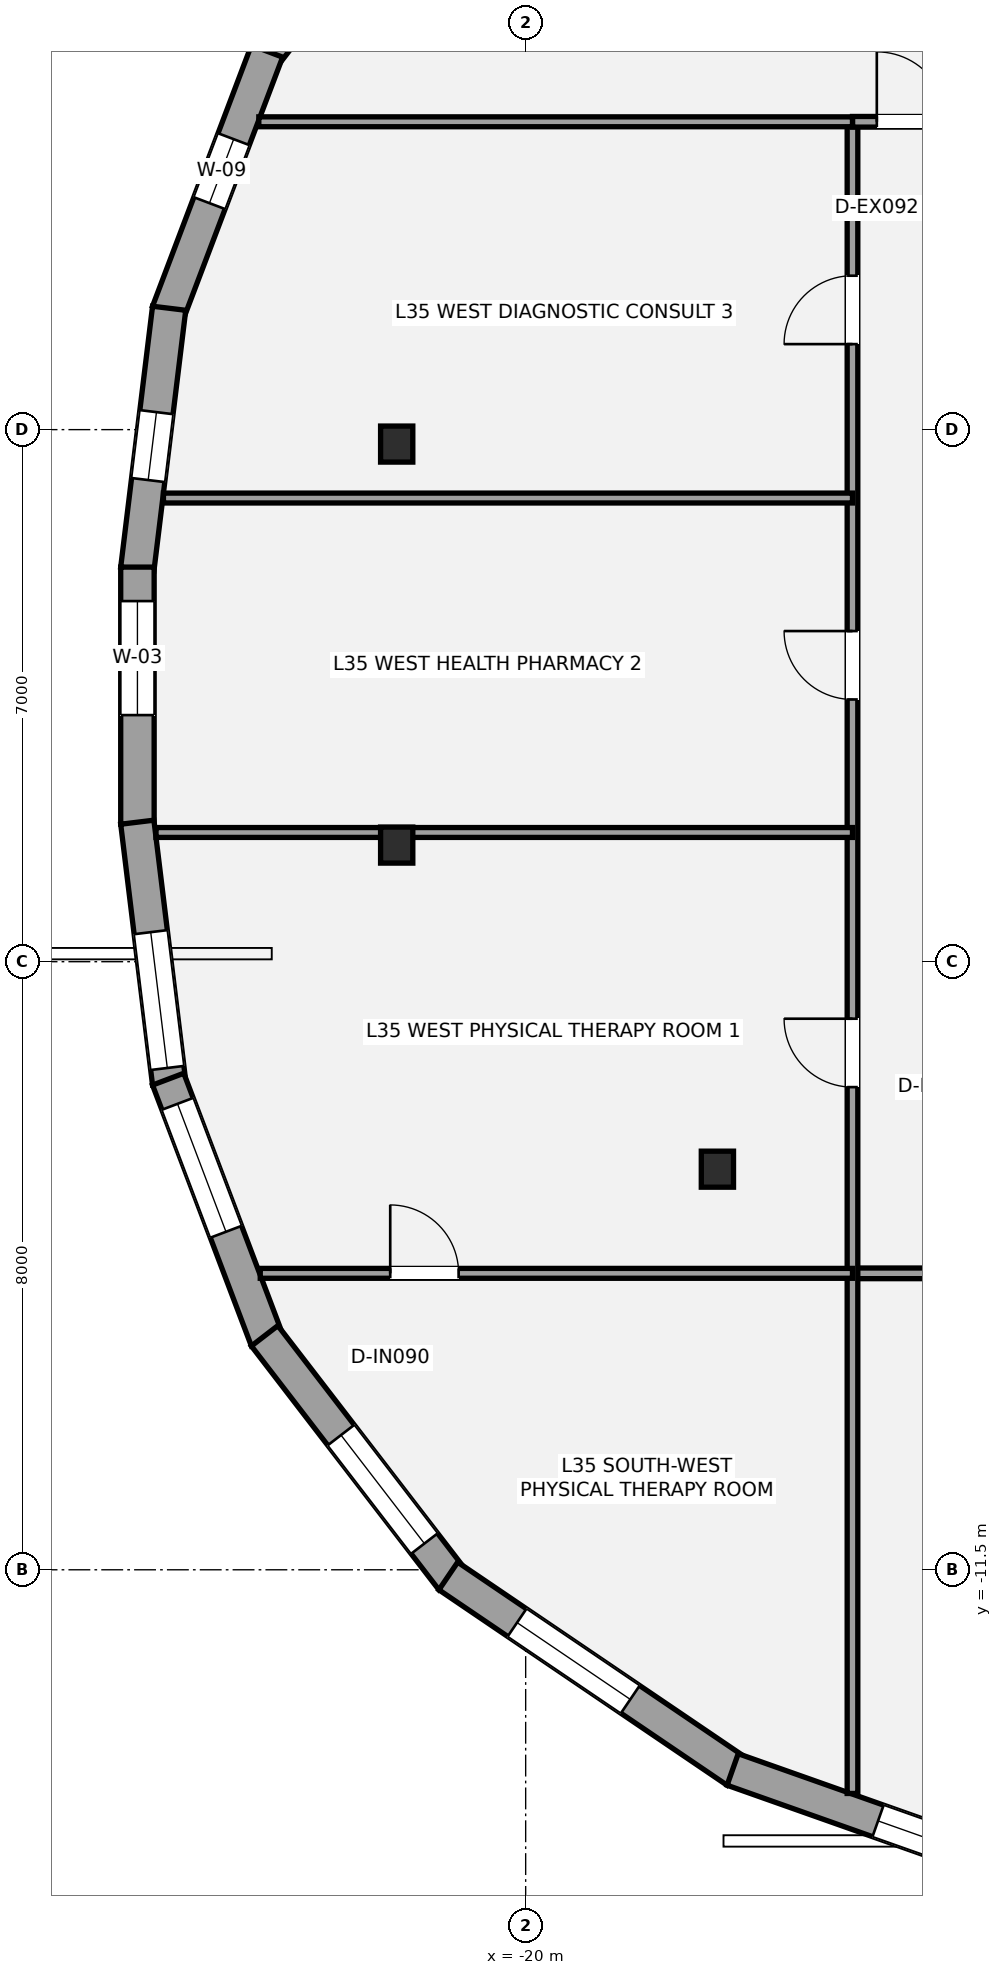
"""IFC4 building model, lengths in metres.
Left out: names, types, materials, properties, quantities, classifications, styles, units other than length and angle.
Written with IfcOpenShell. Run it as: python <this file> out.ifc"""

import sys

from ifc_helpers import new_model, si_unit, direction, frame, frame_2d, origin, origin_2d, place, context, subcontext, project, spatial, rectangle, i_section, extrude, element, fill, save


model = new_model("IFC4")
c1 = context("Model", 3, precision=1e-05, world=origin(), true_north=direction((0.0, 1.0)))
c2 = subcontext(c1, "Body", "Model", "MODEL_VIEW")
j1 = project(units=[si_unit("LENGTHUNIT", "METRE"), si_unit("PLANEANGLEUNIT", "RADIAN")], contexts=[c1])
p1 = place(None, origin())
s1 = spatial("IfcSite", under=j1, at=p1, CompositionType="ELEMENT")
p2 = place(p1, origin())
s2 = spatial("IfcBuilding", under=s1, at=p2, CompositionType="ELEMENT")
p3 = place(p2, frame((0.0, 0.0, 131.6)))
s3 = spatial("IfcBuildingStorey", under=s2, at=p3, CompositionType="ELEMENT", Elevation=131.6)
for number, where, z_axis, x_axis in (
    (1, (-21.697, 3.31, 0.0), (0.0, 0.0, 1.0), (1.0, 0.0, 0.0)),
    (2, (-21.697, -1.966, 0.0), (0.0, 0.0, 1.0), (1.0, 0.0, 0.0)),
    (3, (-17.477, -6.229, 0.0), (0.0, 0.0, 1.0), (1.0, 0.0, 0.0)),
):
    element("IfcColumn", number, at=place(p3, frame(where, z_axis=z_axis, x_axis=x_axis)), inside=s3, PredefinedType="COLUMN", context=c2, shape_type="SweptSolid", body=[
        extrude(i_section(OverallWidth=0.424, OverallDepth=0.474, WebThickness=0.048, FlangeThickness=0.077, at=origin_2d()), origin(), (0.0, 0.0, 1.0), 3.5),
    ])
p4 = place(p3, frame((-23.435, 8.422, 0.0), z_axis=(0.0, 0.0, 1.0), x_axis=(0.60975157382, 0.792592592839, 0.0)))
e4 = element("IfcWall", 4, at=p4, inside=s3, PredefinedType="STANDARD", context=c2, shape_type="SweptSolid", body=[
    extrude(rectangle(XDim=4.047, YDim=0.44, at=frame_2d((2.023, 0.0))), origin(), (0.0, 0.0, 1.0), 2.482),
])
p5 = place(p4, frame((0.649, 0.0, 0.65)))
e5 = element("IfcOpeningElement", 5, at=p5, cuts=e4, PredefinedType="OPENING", context=c2, shape_type="SweptSolid", body=[
    extrude(rectangle(XDim=1.8, YDim=1.7, at=frame_2d((0.9, 0.85))), frame((0.0, 0.23, 0.0), z_axis=(0.0, -1.0, 0.0), x_axis=(1.0, 0.0, 0.0)), (0.0, 0.0, 1.0), 0.46),
])
p6 = place(p3, frame((-24.704, 5.045, 0.0), z_axis=(0.0, 0.0, 1.0), x_axis=(0.354219131363, 0.935162449511, 0.0)))
e6 = element("IfcWall", 6, at=p6, inside=s3, PredefinedType="STANDARD", context=c2, shape_type="SweptSolid", body=[
    extrude(rectangle(XDim=3.671, YDim=0.44, at=frame_2d((1.835, 0.0))), origin(), (0.0, 0.0, 1.0), 2.478),
])
p7 = place(p6, frame((1.534, 0.0, 0.58)))
e7 = element("IfcOpeningElement", 7, at=p7, cuts=e6, PredefinedType="OPENING", context=c2, shape_type="SweptSolid", body=[
    extrude(rectangle(XDim=0.9, YDim=1.35, at=frame_2d((0.45, 0.675))), frame((0.0, 0.23, 0.0), z_axis=(0.0, -1.0, 0.0), x_axis=(1.0, 0.0, 0.0)), (0.0, 0.0, 1.0), 0.46),
])
p8 = place(p3, frame((-25.11, 1.665, 0.0), z_axis=(0.0, 0.0, 1.0), x_axis=(0.121105287727, 0.992639667394, 0.0)))
e8 = element("IfcWall", 8, at=p8, inside=s3, PredefinedType="STANDARD", context=c2, shape_type="SweptSolid", body=[
    extrude(rectangle(XDim=3.457, YDim=0.44, at=frame_2d((1.729, 0.0))), origin(), (0.0, 0.0, 1.0), 2.478),
])
p9 = place(p8, frame((1.181, 0.0, 0.92)))
e9 = element("IfcOpeningElement", 9, at=p9, cuts=e8, PredefinedType="OPENING", context=c2, shape_type="SweptSolid", body=[
    extrude(rectangle(XDim=0.9, YDim=1.35, at=frame_2d((0.45, 0.675))), frame((0.0, 0.23, 0.0), z_axis=(0.0, -1.0, 0.0), x_axis=(1.0, 0.0, 0.0)), (0.0, 0.0, 1.0), 0.46),
])
p10 = place(p3, frame((-25.108, -1.691, 0.0), z_axis=(0.0, 0.0, 1.0), x_axis=(0.0, 1.0, 0.0)))
e10 = element("IfcWall", 10, at=p10, inside=s3, PredefinedType="STANDARD", context=c2, shape_type="SweptSolid", body=[
    extrude(rectangle(XDim=3.383, YDim=0.44, at=frame_2d((1.691, 0.0))), origin(), (0.0, 0.0, 1.0), 2.482),
])
p11 = place(p10, frame((1.436, 0.0, 0.65)))
e11 = element("IfcOpeningElement", 11, at=p11, cuts=e10, PredefinedType="OPENING", context=c2, shape_type="SweptSolid", body=[
    extrude(rectangle(XDim=1.5, YDim=1.7, at=frame_2d((0.75, 0.85))), frame((0.0, 0.23, 0.0), z_axis=(0.0, -1.0, 0.0), x_axis=(1.0, 0.0, 0.0)), (0.0, 0.0, 1.0), 0.46),
])
p12 = place(p3, frame((-24.691, -5.097, 0.0), z_axis=(0.0, 0.0, 1.0), x_axis=(-0.121105287727, 0.992639667394, 0.0)))
e12 = element("IfcWall", 12, at=p12, inside=s3, PredefinedType="STANDARD", context=c2, shape_type="SweptSolid", body=[
    extrude(rectangle(XDim=3.457, YDim=0.44, at=frame_2d((1.729, 0.0))), origin(), (0.0, 0.0, 1.0), 2.478),
])
p13 = place(p12, frame((0.2, 0.0, 0.65)))
e13 = element("IfcOpeningElement", 13, at=p13, cuts=e12, PredefinedType="OPENING", context=c2, shape_type="SweptSolid", body=[
    extrude(rectangle(XDim=1.8, YDim=1.7, at=frame_2d((0.9, 0.85))), frame((0.0, 0.23, 0.0), z_axis=(0.0, -1.0, 0.0), x_axis=(1.0, 0.0, 0.0)), (0.0, 0.0, 1.0), 0.46),
])
p14 = place(p3, frame((-23.403, -8.478, 0.0), z_axis=(0.0, 0.0, 1.0), x_axis=(-0.354219131363, 0.935162449511, 0.0)))
e14 = element("IfcWall", 14, at=p14, inside=s3, PredefinedType="STANDARD", context=c2, shape_type="SweptSolid", body=[
    extrude(rectangle(XDim=3.671, YDim=0.44, at=frame_2d((1.835, 0.0))), origin(), (0.0, 0.0, 1.0), 2.478),
])
p15 = place(p14, frame((1.524, 0.0, 0.65)))
e15 = element("IfcOpeningElement", 15, at=p15, cuts=e14, PredefinedType="OPENING", context=c2, shape_type="SweptSolid", body=[
    extrude(rectangle(XDim=1.8, YDim=1.7, at=frame_2d((0.9, 0.85))), frame((0.0, 0.23, 0.0), z_axis=(0.0, -1.0, 0.0), x_axis=(1.0, 0.0, 0.0)), (0.0, 0.0, 1.0), 0.46),
])
p16 = place(p3, frame((-20.967, -11.63, 0.0), z_axis=(0.0, 0.0, 1.0), x_axis=(-0.60975157382, 0.792592592839, 0.0)))
e16 = element("IfcWall", 16, at=p16, inside=s3, PredefinedType="STANDARD", context=c2, shape_type="SweptSolid", body=[
    extrude(rectangle(XDim=4.047, YDim=0.44, at=frame_2d((2.023, 0.0))), origin(), (0.0, 0.0, 1.0), 2.482),
])
p17 = place(p16, frame((0.599, 0.0, 0.65)))
e17 = element("IfcOpeningElement", 17, at=p17, cuts=e16, PredefinedType="OPENING", context=c2, shape_type="SweptSolid", body=[
    extrude(rectangle(XDim=1.8, YDim=1.7, at=frame_2d((0.9, 0.85))), frame((0.0, 0.23, 0.0), z_axis=(0.0, -1.0, 0.0), x_axis=(1.0, 0.0, 0.0)), (0.0, 0.0, 1.0), 0.46),
])
p18 = place(p3, frame((-17.227, -14.152, 0.0), z_axis=(0.0, 0.0, 1.0), x_axis=(-0.827670311179, 0.561214625605, 0.0)))
e18 = element("IfcWall", 18, at=p18, inside=s3, PredefinedType="STANDARD", context=c2, shape_type="SweptSolid", body=[
    extrude(rectangle(XDim=4.58, YDim=0.44, at=frame_2d((2.29, 0.0))), origin(), (0.0, 0.0, 1.0), 2.482),
])
p19 = place(p18, frame((1.688, 0.0, 0.65)))
e19 = element("IfcOpeningElement", 19, at=p19, cuts=e18, PredefinedType="OPENING", context=c2, shape_type="SweptSolid", body=[
    extrude(rectangle(XDim=1.8, YDim=1.7, at=frame_2d((0.9, 0.85))), frame((0.0, 0.23, 0.0), z_axis=(0.0, -1.0, 0.0), x_axis=(1.0, 0.0, 0.0)), (0.0, 0.0, 1.0), 0.46),
])
p20 = place(p3, frame((-12.546, -15.8, 0.0), z_axis=(0.0, 0.0, 1.0), x_axis=(-0.942780868171, 0.333413009061, 0.0)))
e20 = element("IfcWall", 20, at=p20, inside=s3, PredefinedType="STANDARD", context=c2, shape_type="SweptSolid", body=[
    extrude(rectangle(XDim=5.018, YDim=0.44, at=frame_2d((2.509, 0.0))), origin(), (0.0, 0.0, 1.0), 2.478),
])
p21 = place(p20, frame((1.189, 0.0, 0.65)))
e21 = element("IfcOpeningElement", 21, at=p21, cuts=e20, PredefinedType="OPENING", context=c2, shape_type="SweptSolid", body=[
    extrude(rectangle(XDim=1.8, YDim=1.7, at=frame_2d((0.9, 0.85))), frame((0.0, 0.23, 0.0), z_axis=(0.0, -1.0, 0.0), x_axis=(1.0, 0.0, 0.0)), (0.0, 0.0, 1.0), 0.46),
])
p22 = place(p3, frame((-15.7, -7.6, 0.0), z_axis=(0.0, 0.0, 1.0), x_axis=(1.0, 0.0, 0.0)))
e22 = element("IfcWall", 22, at=p22, inside=s3, PredefinedType="PARTITIONING", context=c2, shape_type="SweptSolid", body=[
    extrude(rectangle(XDim=32.2, YDim=0.14, at=frame_2d((16.1, 0.0))), origin(), (0.0, 0.0, 1.0), 2.638),
])
p23 = place(p22, frame((5.9, 0.0, 0.0)))
e23 = element("IfcOpeningElement", 23, at=p23, cuts=e22, PredefinedType="OPENING", context=c2, shape_type="SweptSolid", body=[
    extrude(rectangle(XDim=0.9, YDim=2.1, at=frame_2d((0.45, 1.05))), frame((0.0, 0.08, 0.0), z_axis=(0.0, -1.0, 0.0), x_axis=(1.0, 0.0, 0.0)), (0.0, 0.0, 1.0), 0.16),
])
p24 = place(p22, frame((16.5, 0.0, 0.0)))
e24 = element("IfcOpeningElement", 24, at=p24, cuts=e22, PredefinedType="OPENING", context=c2, shape_type="SweptSolid", body=[
    extrude(rectangle(XDim=0.9, YDim=2.1, at=frame_2d((0.45, 1.05))), frame((0.0, 0.08, 0.0), z_axis=(0.0, -1.0, 0.0), x_axis=(1.0, 0.0, 0.0)), (0.0, 0.0, 1.0), 0.16),
])
p25 = place(p22, frame((26.25, 0.0, 0.0)))
e25 = element("IfcOpeningElement", 25, at=p25, cuts=e22, PredefinedType="OPENING", context=c2, shape_type="SweptSolid", body=[
    extrude(rectangle(XDim=0.9, YDim=2.1, at=frame_2d((0.45, 1.05))), frame((0.0, 0.08, 0.0), z_axis=(0.0, -1.0, 0.0), x_axis=(1.0, 0.0, 0.0)), (0.0, 0.0, 1.0), 0.16),
])
p26 = place(p3, frame((-15.7, -14.443, 0.0), z_axis=(0.0, 0.0, 1.0), x_axis=(0.0, 1.0, 0.0)))
e26 = element("IfcWall", 26, at=p26, inside=s3, PredefinedType="PARTITIONING", context=c2, shape_type="SweptSolid", body=[
    extrude(rectangle(XDim=21.993, YDim=0.14, at=frame_2d((10.997, 0.0))), origin(), (0.0, 0.0, 1.0), 2.713),
])
p27 = place(p26, frame((9.293, 0.0, 0.0)))
e27 = element("IfcOpeningElement", 27, at=p27, cuts=e26, PredefinedType="OPENING", context=c2, shape_type="SweptSolid", body=[
    extrude(rectangle(XDim=0.9, YDim=2.1, at=frame_2d((0.45, 1.05))), frame((0.0, 0.08, 0.0), z_axis=(0.0, -1.0, 0.0), x_axis=(1.0, 0.0, 0.0)), (0.0, 0.0, 1.0), 0.16),
])
p28 = place(p26, frame((14.393, 0.0, 0.0)))
e28 = element("IfcOpeningElement", 28, at=p28, cuts=e26, PredefinedType="OPENING", context=c2, shape_type="SweptSolid", body=[
    extrude(rectangle(XDim=0.9, YDim=2.1, at=frame_2d((0.45, 1.05))), frame((0.0, 0.08, 0.0), z_axis=(0.0, -1.0, 0.0), x_axis=(1.0, 0.0, 0.0)), (0.0, 0.0, 1.0), 0.16),
])
p29 = place(p26, frame((19.068, 0.0, 0.0)))
e29 = element("IfcOpeningElement", 29, at=p29, cuts=e26, PredefinedType="OPENING", context=c2, shape_type="SweptSolid", body=[
    extrude(rectangle(XDim=0.9, YDim=2.1, at=frame_2d((0.45, 1.05))), frame((0.0, 0.08, 0.0), z_axis=(0.0, -1.0, 0.0), x_axis=(1.0, 0.0, 0.0)), (0.0, 0.0, 1.0), 0.16),
])
p30 = place(p3, frame((-15.7, 7.55, 0.0), z_axis=(0.0, 0.0, 1.0), x_axis=(1.0, 0.0, 0.0)))
e30 = element("IfcWall", 30, at=p30, inside=s3, PredefinedType="PARTITIONING", context=c2, shape_type="SweptSolid", body=[
    extrude(rectangle(XDim=1.8, YDim=0.14, at=frame_2d((0.9, 0.0))), origin(), (0.0, 0.0, 1.0), 3.26),
])
p31 = place(p30, frame((0.32, 0.0, 0.0)))
e31 = element("IfcOpeningElement", 31, at=p31, cuts=e30, PredefinedType="OPENING", context=c2, shape_type="SweptSolid", body=[
    extrude(rectangle(XDim=0.92, YDim=2.15, at=frame_2d((0.46, 1.075))), frame((0.0, 0.08, 0.0), z_axis=(0.0, -1.0, 0.0), x_axis=(1.0, 0.0, 0.0)), (0.0, 0.0, 1.0), 0.16),
])
p32 = place(p3, frame((-23.511, 7.55, 0.0), z_axis=(0.0, 0.0, 1.0), x_axis=(1.0, 0.0, 0.0)))
e32 = element("IfcWall", 32, at=p32, inside=s3, PredefinedType="PARTITIONING", context=c2, shape_type="SweptSolid", body=[
    extrude(rectangle(XDim=7.811, YDim=0.13, at=frame_2d((3.906, 0.0))), origin(), (0.0, 0.0, 1.0), 2.713),
])
p33 = place(p3, frame((-23.492, -7.6, 0.0), z_axis=(0.0, 0.0, 1.0), x_axis=(1.0, 0.0, 0.0)))
e33 = element("IfcWall", 33, at=p33, inside=s3, PredefinedType="PARTITIONING", context=c2, shape_type="SweptSolid", body=[
    extrude(rectangle(XDim=7.792, YDim=0.13, at=frame_2d((3.896, 0.0))), origin(), (0.0, 0.0, 1.0), 2.713),
])
p34 = place(p33, frame((1.71, 0.0, 0.0)))
e34 = element("IfcOpeningElement", 34, at=p34, cuts=e33, PredefinedType="OPENING", context=c2, shape_type="SweptSolid", body=[
    extrude(rectangle(XDim=0.9, YDim=2.1, at=frame_2d((0.45, 1.05))), frame((0.0, 0.075, 0.0), z_axis=(0.0, -1.0, 0.0), x_axis=(1.0, 0.0, 0.0)), (0.0, 0.0, 1.0), 0.15),
])
p35 = place(p3, frame((-24.864, -1.8, 0.0), z_axis=(0.0, 0.0, 1.0), x_axis=(1.0, 0.0, 0.0)))
e35 = element("IfcWall", 35, at=p35, inside=s3, PredefinedType="PARTITIONING", context=c2, shape_type="SweptSolid", body=[
    extrude(rectangle(XDim=9.164, YDim=0.13, at=frame_2d((4.582, 0.0))), origin(), (0.0, 0.0, 1.0), 2.713),
])
p36 = place(p3, frame((-24.766, 2.6, 0.0), z_axis=(0.0, 0.0, 1.0), x_axis=(1.0, 0.0, 0.0)))
e36 = element("IfcWall", 36, at=p36, inside=s3, PredefinedType="PARTITIONING", context=c2, shape_type="SweptSolid", body=[
    extrude(rectangle(XDim=9.066, YDim=0.13, at=frame_2d((4.533, 0.0))), origin(), (0.0, 0.0, 1.0), 2.713),
])
p37 = place(p7, origin())
e37 = element("IfcWindow", 37, at=p37, inside=s3, PartitioningType="SINGLE_PANEL", PredefinedType="WINDOW", context=c2, shape_type="SweptSolid", body=[
    extrude(rectangle(XDim=0.9, YDim=1.35, at=frame_2d((0.45, 0.675))), frame((0.0, -0.01, 0.0), z_axis=(0.0, -1.0, 0.0), x_axis=(1.0, 0.0, 0.0)), (0.0, 0.0, 1.0), 0.06),
])
fill(e7, e37)
p38 = place(p9, origin())
e38 = element("IfcWindow", 38, at=p38, inside=s3, PartitioningType="SINGLE_PANEL", PredefinedType="WINDOW", context=c2, shape_type="SweptSolid", body=[
    extrude(rectangle(XDim=0.9, YDim=1.35, at=frame_2d((0.45, 0.675))), frame((0.0, -0.01, 0.0), z_axis=(0.0, -1.0, 0.0), x_axis=(1.0, 0.0, 0.0)), (0.0, 0.0, 1.0), 0.06),
])
fill(e9, e38)
p39 = place(p11, origin())
e39 = element("IfcWindow", 39, at=p39, inside=s3, PartitioningType="SINGLE_PANEL", PredefinedType="WINDOW", context=c2, shape_type="SweptSolid", body=[
    extrude(rectangle(XDim=1.5, YDim=1.7, at=frame_2d((0.75, 0.85))), frame((0.0, -0.01, 0.0), z_axis=(0.0, -1.0, 0.0), x_axis=(1.0, 0.0, 0.0)), (0.0, 0.0, 1.0), 0.06),
])
fill(e11, e39)
p40 = place(p13, origin())
e40 = element("IfcWindow", 40, at=p40, inside=s3, PartitioningType="SINGLE_PANEL", PredefinedType="WINDOW", context=c2, shape_type="SweptSolid", body=[
    extrude(rectangle(XDim=1.8, YDim=1.7, at=frame_2d((0.9, 0.85))), frame((0.0, -0.01, 0.0), z_axis=(0.0, -1.0, 0.0), x_axis=(1.0, 0.0, 0.0)), (0.0, 0.0, 1.0), 0.06),
])
fill(e13, e40)
p41 = place(p15, origin())
e41 = element("IfcWindow", 41, at=p41, inside=s3, PartitioningType="SINGLE_PANEL", PredefinedType="WINDOW", context=c2, shape_type="SweptSolid", body=[
    extrude(rectangle(XDim=1.8, YDim=1.7, at=frame_2d((0.9, 0.85))), frame((0.0, -0.01, 0.0), z_axis=(0.0, -1.0, 0.0), x_axis=(1.0, 0.0, 0.0)), (0.0, 0.0, 1.0), 0.06),
])
fill(e15, e41)
p42 = place(p17, origin())
e42 = element("IfcWindow", 42, at=p42, inside=s3, PartitioningType="SINGLE_PANEL", PredefinedType="WINDOW", context=c2, shape_type="SweptSolid", body=[
    extrude(rectangle(XDim=1.8, YDim=1.7, at=frame_2d((0.9, 0.85))), frame((0.0, -0.01, 0.0), z_axis=(0.0, -1.0, 0.0), x_axis=(1.0, 0.0, 0.0)), (0.0, 0.0, 1.0), 0.06),
])
fill(e17, e42)
p43 = place(p19, origin())
e43 = element("IfcWindow", 43, at=p43, inside=s3, PartitioningType="SINGLE_PANEL", PredefinedType="WINDOW", context=c2, shape_type="SweptSolid", body=[
    extrude(rectangle(XDim=1.8, YDim=1.7, at=frame_2d((0.9, 0.85))), frame((0.0, -0.01, 0.0), z_axis=(0.0, -1.0, 0.0), x_axis=(1.0, 0.0, 0.0)), (0.0, 0.0, 1.0), 0.06),
])
fill(e19, e43)
p44 = place(p21, origin())
e44 = element("IfcWindow", 44, at=p44, inside=s3, PartitioningType="SINGLE_PANEL", PredefinedType="WINDOW", context=c2, shape_type="SweptSolid", body=[
    extrude(rectangle(XDim=1.8, YDim=1.7, at=frame_2d((0.9, 0.85))), frame((0.0, -0.01, 0.0), z_axis=(0.0, -1.0, 0.0), x_axis=(1.0, 0.0, 0.0)), (0.0, 0.0, 1.0), 0.06),
])
fill(e21, e44)
p45 = place(p31, origin())
e45 = element("IfcDoor", 45, at=p45, inside=s3, OperationType="SINGLE_SWING_LEFT", PredefinedType="DOOR", context=c2, shape_type="SweptSolid", body=[
    extrude(rectangle(XDim=0.92, YDim=2.15, at=frame_2d((0.46, 1.075))), frame((0.0, 0.025, 0.0), z_axis=(0.0, -1.0, 0.0), x_axis=(1.0, 0.0, 0.0)), (0.0, 0.0, 1.0), 0.05),
])
fill(e31, e45)
p46 = place(p34, origin())
e46 = element("IfcDoor", 46, at=p46, inside=s3, OperationType="SINGLE_SWING_LEFT", PredefinedType="DOOR", context=c2, shape_type="SweptSolid", body=[
    extrude(rectangle(XDim=0.9, YDim=2.1, at=frame_2d((0.45, 1.05))), frame((0.0, 0.025, 0.0), z_axis=(0.0, -1.0, 0.0), x_axis=(1.0, 0.0, 0.0)), (0.0, 0.0, 1.0), 0.05),
])
fill(e34, e46)
p47 = place(p27, origin())
e47 = element("IfcDoor", 47, at=p47, inside=s3, OperationType="SINGLE_SWING_RIGHT", PredefinedType="DOOR", context=c2, shape_type="SweptSolid", body=[
    extrude(rectangle(XDim=0.9, YDim=2.1, at=frame_2d((0.45, 1.05))), frame((0.0, 0.025, 0.0), z_axis=(0.0, -1.0, 0.0), x_axis=(1.0, 0.0, 0.0)), (0.0, 0.0, 1.0), 0.05),
])
fill(e27, e47)
p48 = place(p28, origin())
e48 = element("IfcDoor", 48, at=p48, inside=s3, OperationType="SINGLE_SWING_RIGHT", PredefinedType="DOOR", context=c2, shape_type="SweptSolid", body=[
    extrude(rectangle(XDim=0.9, YDim=2.1, at=frame_2d((0.45, 1.05))), frame((0.0, 0.025, 0.0), z_axis=(0.0, -1.0, 0.0), x_axis=(1.0, 0.0, 0.0)), (0.0, 0.0, 1.0), 0.05),
])
fill(e28, e48)
p49 = place(p29, origin())
e49 = element("IfcDoor", 49, at=p49, inside=s3, OperationType="SINGLE_SWING_LEFT", PredefinedType="DOOR", context=c2, shape_type="SweptSolid", body=[
    extrude(rectangle(XDim=0.9, YDim=2.1, at=frame_2d((0.45, 1.05))), frame((0.0, 0.025, 0.0), z_axis=(0.0, -1.0, 0.0), x_axis=(1.0, 0.0, 0.0)), (0.0, 0.0, 1.0), 0.05),
])
fill(e29, e49)
save(model, sys.argv[1])
